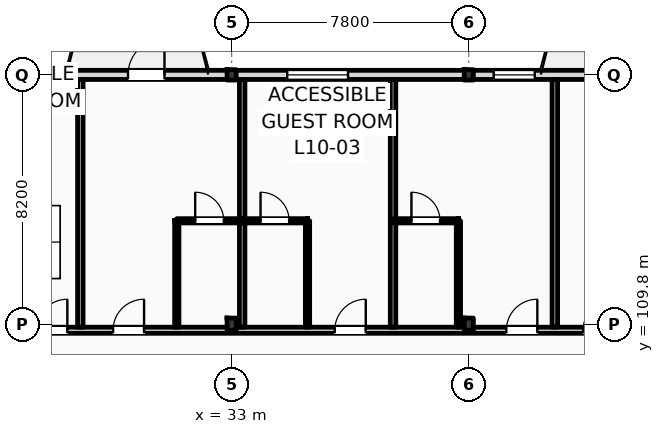
"""IFC4 building model, lengths in metres.
Left out: names, types, materials, properties, quantities, classifications, styles, units other than length and angle.
Written with IfcOpenShell. Run it as: python <this file> out.ifc"""

import sys

from ifc_helpers import new_model, si_unit, direction, frame, frame_2d, origin, origin_2d, place, context, subcontext, project, spatial, rectangle, i_section, extrude, element, fill, save


model = new_model("IFC4")
c1 = context("Model", 3, precision=1e-05, world=origin(), true_north=direction((0.0, 1.0)))
c2 = subcontext(c1, "Body", "Model", "MODEL_VIEW")
j1 = project(units=[si_unit("LENGTHUNIT", "METRE"), si_unit("PLANEANGLEUNIT", "RADIAN")], contexts=[c1])
p1 = place(None, origin())
s1 = spatial("IfcSite", under=j1, at=p1, CompositionType="ELEMENT")
p2 = place(p1, origin())
s2 = spatial("IfcBuilding", under=s1, at=p2, CompositionType="ELEMENT")
p3 = place(p2, frame((0.0, 0.0, 42.6)))
s3 = spatial("IfcBuildingStorey", under=s2, at=p3, CompositionType="ELEMENT", Elevation=42.6)
p4 = place(p3, frame((33.0, 109.8, 0.0), z_axis=(0.0, 0.0, 1.0), x_axis=(1.0, 0.0, 0.0)))
e1 = element("IfcColumn", 1, at=p4, inside=s3, PredefinedType="COLUMN", context=c2, shape_type="SweptSolid", body=[
    extrude(i_section(OverallWidth=0.3, OverallDepth=0.4, WebThickness=0.013, FlangeThickness=0.024, FilletRadius=0.027, at=origin_2d()), origin(), (0.0, 0.0, 1.0), 4.2),
])
p5 = place(p3, frame((33.0, 118.0, 0.0), z_axis=(0.0, 0.0, 1.0), x_axis=(1.0, 0.0, 0.0)))
e2 = element("IfcColumn", 2, at=p5, inside=s3, PredefinedType="COLUMN", context=c2, shape_type="SweptSolid", body=[
    extrude(i_section(OverallWidth=0.3, OverallDepth=0.34, WebThickness=0.012, FlangeThickness=0.021, FilletRadius=0.027, at=origin_2d()), origin(), (0.0, 0.0, 1.0), 4.2),
])
p6 = place(p3, frame((40.8, 109.8, 0.0), z_axis=(0.0, 0.0, 1.0), x_axis=(1.0, 0.0, 0.0)))
e3 = element("IfcColumn", 3, at=p6, inside=s3, PredefinedType="COLUMN", context=c2, shape_type="SweptSolid", body=[
    extrude(i_section(OverallWidth=0.3, OverallDepth=0.4, WebThickness=0.013, FlangeThickness=0.024, FilletRadius=0.027, at=origin_2d()), origin(), (0.0, 0.0, 1.0), 4.2),
])
p7 = place(p3, frame((40.8, 118.0, 0.0), z_axis=(0.0, 0.0, 1.0), x_axis=(1.0, 0.0, 0.0)))
e4 = element("IfcColumn", 4, at=p7, inside=s3, PredefinedType="COLUMN", context=c2, shape_type="SweptSolid", body=[
    extrude(i_section(OverallWidth=0.3, OverallDepth=0.34, WebThickness=0.012, FlangeThickness=0.021, FilletRadius=0.027, at=origin_2d()), origin(), (0.0, 0.0, 1.0), 4.2),
])
p8 = place(p3, frame((22.5, 118.0, 0.0), z_axis=(0.0, 0.0, 1.0), x_axis=(1.0, 0.0, 0.0)))
e5 = element("IfcWall", 5, at=p8, inside=s3, PredefinedType="STANDARD", context=c2, shape_type="SweptSolid", body=[
    extrude(rectangle(XDim=72.9, YDim=0.3, at=frame_2d((36.45, 0.0))), origin(), (0.0, 0.0, 1.0), 3.42),
])
p9 = place(p8, frame((3.611, 0.0, 0.9)))
e6 = element("IfcOpeningElement", 6, at=p9, cuts=e5, PredefinedType="OPENING", context=c2, shape_type="SweptSolid", body=[
    extrude(rectangle(XDim=1.35, YDim=1.75, at=frame_2d((0.675, 0.875))), frame((0.0, 0.16, 0.0), z_axis=(0.0, -1.0, 0.0), x_axis=(1.0, 0.0, 0.0)), (0.0, 0.0, 1.0), 0.32),
])
p10 = place(p8, frame((7.091, 0.0, 0.0)))
e7 = element("IfcOpeningElement", 7, at=p10, cuts=e5, PredefinedType="OPENING", context=c2, shape_type="SweptSolid", body=[
    extrude(rectangle(XDim=1.2, YDim=2.25, at=frame_2d((0.6, 1.125))), frame((0.0, 0.16, 0.0), z_axis=(0.0, -1.0, 0.0), x_axis=(1.0, 0.0, 0.0)), (0.0, 0.0, 1.0), 0.32),
])
p11 = place(p8, frame((12.328, 0.0, 0.9)))
e8 = element("IfcOpeningElement", 8, at=p11, cuts=e5, PredefinedType="OPENING", context=c2, shape_type="SweptSolid", body=[
    extrude(rectangle(XDim=2.0, YDim=2.34, at=frame_2d((1.0, 1.17))), frame((0.0, 0.16, 0.0), z_axis=(0.0, -1.0, 0.0), x_axis=(1.0, 0.0, 0.0)), (0.0, 0.0, 1.0), 0.32),
])
p12 = place(p8, frame((19.12, 0.0, 0.9)))
e9 = element("IfcOpeningElement", 9, at=p12, cuts=e5, PredefinedType="OPENING", context=c2, shape_type="SweptSolid", body=[
    extrude(rectangle(XDim=1.35, YDim=2.34, at=frame_2d((0.675, 1.17))), frame((0.0, 0.16, 0.0), z_axis=(0.0, -1.0, 0.0), x_axis=(1.0, 0.0, 0.0)), (0.0, 0.0, 1.0), 0.32),
])
p13 = place(p8, frame((22.696, 0.0, 0.0)))
e10 = element("IfcOpeningElement", 10, at=p13, cuts=e5, PredefinedType="OPENING", context=c2, shape_type="SweptSolid", body=[
    extrude(rectangle(XDim=1.2, YDim=2.25, at=frame_2d((0.6, 1.125))), frame((0.0, 0.16, 0.0), z_axis=(0.0, -1.0, 0.0), x_axis=(1.0, 0.0, 0.0)), (0.0, 0.0, 1.0), 0.32),
])
p14 = place(p8, frame((27.205, 0.0, 0.9)))
e11 = element("IfcOpeningElement", 11, at=p14, cuts=e5, PredefinedType="OPENING", context=c2, shape_type="SweptSolid", body=[
    extrude(rectangle(XDim=3.1, YDim=2.34, at=frame_2d((1.55, 1.17))), frame((0.0, 0.16, 0.0), z_axis=(0.0, -1.0, 0.0), x_axis=(1.0, 0.0, 0.0)), (0.0, 0.0, 1.0), 0.32),
])
p15 = place(p8, frame((31.948, 0.0, 0.9)))
e12 = element("IfcOpeningElement", 12, at=p15, cuts=e5, PredefinedType="OPENING", context=c2, shape_type="SweptSolid", body=[
    extrude(rectangle(XDim=1.1, YDim=2.34, at=frame_2d((0.55, 1.17))), frame((0.0, 0.16, 0.0), z_axis=(0.0, -1.0, 0.0), x_axis=(1.0, 0.0, 0.0)), (0.0, 0.0, 1.0), 0.32),
])
p16 = place(p8, frame((38.12, 0.0, 0.0)))
e13 = element("IfcOpeningElement", 13, at=p16, cuts=e5, PredefinedType="OPENING", context=c2, shape_type="SweptSolid", body=[
    extrude(rectangle(XDim=1.2, YDim=2.25, at=frame_2d((0.6, 1.125))), frame((0.0, 0.16, 0.0), z_axis=(0.0, -1.0, 0.0), x_axis=(1.0, 0.0, 0.0)), (0.0, 0.0, 1.0), 0.32),
])
p17 = place(p8, frame((43.51, 0.0, 0.9)))
e14 = element("IfcOpeningElement", 14, at=p17, cuts=e5, PredefinedType="OPENING", context=c2, shape_type="SweptSolid", body=[
    extrude(rectangle(XDim=1.35, YDim=1.85, at=frame_2d((0.675, 0.925))), frame((0.0, 0.16, 0.0), z_axis=(0.0, -1.0, 0.0), x_axis=(1.0, 0.0, 0.0)), (0.0, 0.0, 1.0), 0.32),
])
p18 = place(p8, frame((47.178, 0.0, 0.9)))
e15 = element("IfcOpeningElement", 15, at=p18, cuts=e5, PredefinedType="OPENING", context=c2, shape_type="SweptSolid", body=[
    extrude(rectangle(XDim=1.5, YDim=1.9, at=frame_2d((0.75, 0.95))), frame((0.0, 0.16, 0.0), z_axis=(0.0, -1.0, 0.0), x_axis=(1.0, 0.0, 0.0)), (0.0, 0.0, 1.0), 0.32),
])
p19 = place(p8, frame((53.724, 0.0, 0.0)))
e16 = element("IfcOpeningElement", 16, at=p19, cuts=e5, PredefinedType="OPENING", context=c2, shape_type="SweptSolid", body=[
    extrude(rectangle(XDim=1.2, YDim=2.25, at=frame_2d((0.6, 1.125))), frame((0.0, 0.16, 0.0), z_axis=(0.0, -1.0, 0.0), x_axis=(1.0, 0.0, 0.0)), (0.0, 0.0, 1.0), 0.32),
])
p20 = place(p8, frame((58.712, 0.0, 0.9)))
e17 = element("IfcOpeningElement", 17, at=p20, cuts=e5, PredefinedType="OPENING", context=c2, shape_type="SweptSolid", body=[
    extrude(rectangle(XDim=1.8, YDim=2.0, at=frame_2d((0.9, 1.0))), frame((0.0, 0.16, 0.0), z_axis=(0.0, -1.0, 0.0), x_axis=(1.0, 0.0, 0.0)), (0.0, 0.0, 1.0), 0.32),
])
p21 = place(p8, frame((62.781, 0.0, 0.9)))
e18 = element("IfcOpeningElement", 18, at=p21, cuts=e5, PredefinedType="OPENING", context=c2, shape_type="SweptSolid", body=[
    extrude(rectangle(XDim=1.35, YDim=2.05, at=frame_2d((0.675, 1.025))), frame((0.0, 0.16, 0.0), z_axis=(0.0, -1.0, 0.0), x_axis=(1.0, 0.0, 0.0)), (0.0, 0.0, 1.0), 0.32),
])
p22 = place(p8, frame((68.819, 0.0, 0.9)))
e19 = element("IfcOpeningElement", 19, at=p22, cuts=e5, PredefinedType="OPENING", context=c2, shape_type="SweptSolid", body=[
    extrude(rectangle(XDim=2.1, YDim=2.1, at=frame_2d((1.05, 1.05))), frame((0.0, 0.16, 0.0), z_axis=(0.0, -1.0, 0.0), x_axis=(1.0, 0.0, 0.0)), (0.0, 0.0, 1.0), 0.32),
])
p23 = place(p3, frame((10.65, 109.6, 0.0), z_axis=(0.0, 0.0, 1.0), x_axis=(1.0, 0.0, 0.0)))
e20 = element("IfcWall", 20, at=p23, inside=s3, PredefinedType="PARTITIONING", context=c2, shape_type="SweptSolid", body=[
    extrude(rectangle(XDim=84.61, YDim=0.2, at=frame_2d((42.305, 0.0))), origin(), (0.0, 0.0, 1.0), 3.38),
])
p24 = place(p23, frame((15.926, 0.0, 0.0)))
e21 = element("IfcOpeningElement", 21, at=p24, cuts=e20, PredefinedType="OPENING", context=c2, shape_type="SweptSolid", body=[
    extrude(rectangle(XDim=1.02, YDim=2.2, at=frame_2d((0.51, 1.1))), frame((0.0, 0.11, 0.0), z_axis=(0.0, -1.0, 0.0), x_axis=(1.0, 0.0, 0.0)), (0.0, 0.0, 1.0), 0.22),
])
p25 = place(p23, frame((18.45, 0.0, 0.0)))
e22 = element("IfcOpeningElement", 22, at=p25, cuts=e20, PredefinedType="OPENING", context=c2, shape_type="SweptSolid", body=[
    extrude(rectangle(XDim=1.02, YDim=2.2, at=frame_2d((0.51, 1.1))), frame((0.0, 0.11, 0.0), z_axis=(0.0, -1.0, 0.0), x_axis=(1.0, 0.0, 0.0)), (0.0, 0.0, 1.0), 0.22),
])
p26 = place(p23, frame((25.742, 0.0, 0.0)))
e23 = element("IfcOpeningElement", 23, at=p26, cuts=e20, PredefinedType="OPENING", context=c2, shape_type="SweptSolid", body=[
    extrude(rectangle(XDim=1.02, YDim=2.2, at=frame_2d((0.51, 1.1))), frame((0.0, 0.11, 0.0), z_axis=(0.0, -1.0, 0.0), x_axis=(1.0, 0.0, 0.0)), (0.0, 0.0, 1.0), 0.22),
])
p27 = place(p23, frame((31.385, 0.0, 0.0)))
e24 = element("IfcOpeningElement", 24, at=p27, cuts=e20, PredefinedType="OPENING", context=c2, shape_type="SweptSolid", body=[
    extrude(rectangle(XDim=1.02, YDim=2.2, at=frame_2d((0.51, 1.1))), frame((0.0, 0.11, 0.0), z_axis=(0.0, -1.0, 0.0), x_axis=(1.0, 0.0, 0.0)), (0.0, 0.0, 1.0), 0.22),
])
p28 = place(p23, frame((33.908, 0.0, 0.0)))
e25 = element("IfcOpeningElement", 25, at=p28, cuts=e20, PredefinedType="OPENING", context=c2, shape_type="SweptSolid", body=[
    extrude(rectangle(XDim=0.96, YDim=2.2, at=frame_2d((0.48, 1.1))), frame((0.0, 0.11, 0.0), z_axis=(0.0, -1.0, 0.0), x_axis=(1.0, 0.0, 0.0)), (0.0, 0.0, 1.0), 0.22),
])
p29 = place(p23, frame((41.201, 0.0, 0.0)))
e26 = element("IfcOpeningElement", 26, at=p29, cuts=e20, PredefinedType="OPENING", context=c2, shape_type="SweptSolid", body=[
    extrude(rectangle(XDim=0.96, YDim=2.2, at=frame_2d((0.48, 1.1))), frame((0.0, 0.11, 0.0), z_axis=(0.0, -1.0, 0.0), x_axis=(1.0, 0.0, 0.0)), (0.0, 0.0, 1.0), 0.22),
])
p30 = place(p23, frame((46.844, 0.0, 0.0)))
e27 = element("IfcOpeningElement", 27, at=p30, cuts=e20, PredefinedType="OPENING", context=c2, shape_type="SweptSolid", body=[
    extrude(rectangle(XDim=0.96, YDim=2.2, at=frame_2d((0.48, 1.1))), frame((0.0, 0.11, 0.0), z_axis=(0.0, -1.0, 0.0), x_axis=(1.0, 0.0, 0.0)), (0.0, 0.0, 1.0), 0.22),
])
p31 = place(p23, frame((49.337, 0.0, 0.0)))
e28 = element("IfcOpeningElement", 28, at=p31, cuts=e20, PredefinedType="OPENING", context=c2, shape_type="SweptSolid", body=[
    extrude(rectangle(XDim=0.96, YDim=2.2, at=frame_2d((0.48, 1.1))), frame((0.0, 0.11, 0.0), z_axis=(0.0, -1.0, 0.0), x_axis=(1.0, 0.0, 0.0)), (0.0, 0.0, 1.0), 0.22),
])
p32 = place(p23, frame((56.63, 0.0, 0.0)))
e29 = element("IfcOpeningElement", 29, at=p32, cuts=e20, PredefinedType="OPENING", context=c2, shape_type="SweptSolid", body=[
    extrude(rectangle(XDim=0.96, YDim=2.2, at=frame_2d((0.48, 1.1))), frame((0.0, 0.11, 0.0), z_axis=(0.0, -1.0, 0.0), x_axis=(1.0, 0.0, 0.0)), (0.0, 0.0, 1.0), 0.22),
])
p33 = place(p23, frame((62.523, 0.0, 0.0)))
e30 = element("IfcOpeningElement", 30, at=p33, cuts=e20, PredefinedType="OPENING", context=c2, shape_type="SweptSolid", body=[
    extrude(rectangle(XDim=0.96, YDim=2.2, at=frame_2d((0.48, 1.1))), frame((0.0, 0.11, 0.0), z_axis=(0.0, -1.0, 0.0), x_axis=(1.0, 0.0, 0.0)), (0.0, 0.0, 1.0), 0.22),
])
p34 = place(p23, frame((64.765, 0.0, 0.0)))
e31 = element("IfcOpeningElement", 31, at=p34, cuts=e20, PredefinedType="OPENING", context=c2, shape_type="SweptSolid", body=[
    extrude(rectangle(XDim=0.96, YDim=2.2, at=frame_2d((0.48, 1.1))), frame((0.0, 0.11, 0.0), z_axis=(0.0, -1.0, 0.0), x_axis=(1.0, 0.0, 0.0)), (0.0, 0.0, 1.0), 0.22),
])
p35 = place(p23, frame((72.057, 0.0, 0.0)))
e32 = element("IfcOpeningElement", 32, at=p35, cuts=e20, PredefinedType="OPENING", context=c2, shape_type="SweptSolid", body=[
    extrude(rectangle(XDim=0.96, YDim=2.2, at=frame_2d((0.48, 1.1))), frame((0.0, 0.11, 0.0), z_axis=(0.0, -1.0, 0.0), x_axis=(1.0, 0.0, 0.0)), (0.0, 0.0, 1.0), 0.22),
])
p36 = place(p23, frame((74.55, 0.0, 0.0)))
e33 = element("IfcOpeningElement", 33, at=p36, cuts=e20, PredefinedType="OPENING", context=c2, shape_type="SweptSolid", body=[
    extrude(rectangle(XDim=0.96, YDim=2.2, at=frame_2d((0.48, 1.1))), frame((0.0, 0.11, 0.0), z_axis=(0.0, -1.0, 0.0), x_axis=(1.0, 0.0, 0.0)), (0.0, 0.0, 1.0), 0.22),
])
p37 = place(p23, frame((80.163, 0.0, 0.0)))
e34 = element("IfcOpeningElement", 34, at=p37, cuts=e20, PredefinedType="OPENING", context=c2, shape_type="SweptSolid", body=[
    extrude(rectangle(XDim=0.96, YDim=2.2, at=frame_2d((0.48, 1.1))), frame((0.0, 0.11, 0.0), z_axis=(0.0, -1.0, 0.0), x_axis=(1.0, 0.0, 0.0)), (0.0, 0.0, 1.0), 0.22),
])
p38 = place(p23, frame((2.716, 0.0, 0.0)))
e35 = element("IfcOpeningElement", 35, at=p38, cuts=e20, PredefinedType="OPENING", context=c2, shape_type="SweptSolid", body=[
    extrude(rectangle(XDim=1.35, YDim=2.25, at=frame_2d((0.675, 1.125))), frame((0.0, 0.11, 0.0), z_axis=(0.0, -1.0, 0.0), x_axis=(1.0, 0.0, 0.0)), (0.0, 0.0, 1.0), 0.22),
])
p39 = place(p23, frame((6.65, 0.0, 0.0)))
e36 = element("IfcOpeningElement", 36, at=p39, cuts=e20, PredefinedType="OPENING", context=c2, shape_type="SweptSolid", body=[
    extrude(rectangle(XDim=1.35, YDim=2.25, at=frame_2d((0.675, 1.125))), frame((0.0, 0.11, 0.0), z_axis=(0.0, -1.0, 0.0), x_axis=(1.0, 0.0, 0.0)), (0.0, 0.0, 1.0), 0.22),
])
p40 = place(p23, frame((10.583, 0.0, 0.0)))
e37 = element("IfcOpeningElement", 37, at=p40, cuts=e20, PredefinedType="OPENING", context=c2, shape_type="SweptSolid", body=[
    extrude(rectangle(XDim=1.35, YDim=2.25, at=frame_2d((0.675, 1.125))), frame((0.0, 0.11, 0.0), z_axis=(0.0, -1.0, 0.0), x_axis=(1.0, 0.0, 0.0)), (0.0, 0.0, 1.0), 0.22),
])
p41 = place(p3, frame((28.023, 109.7, 0.0), z_axis=(0.0, 0.0, 1.0), x_axis=(0.0, 1.0, 0.0)))
e38 = element("IfcWall", 38, at=p41, inside=s3, PredefinedType="PARTITIONING", context=c2, shape_type="SweptSolid", body=[
    extrude(rectangle(XDim=8.15, YDim=0.18, at=frame_2d((4.075, 0.0))), origin(), (0.0, 0.0, 1.0), 3.63),
])
p42 = place(p3, frame((33.346, 109.7, 0.0), z_axis=(0.0, 0.0, 1.0), x_axis=(0.0, 1.0, 0.0)))
e39 = element("IfcWall", 39, at=p42, inside=s3, PredefinedType="PARTITIONING", context=c2, shape_type="SweptSolid", body=[
    extrude(rectangle(XDim=8.15, YDim=0.18, at=frame_2d((4.075, 0.0))), origin(), (0.0, 0.0, 1.0), 3.94),
])
p43 = place(p3, frame((31.196, 109.7, 0.0), z_axis=(0.0, 0.0, 1.0), x_axis=(0.0, 1.0, 0.0)))
e40 = element("IfcWall", 40, at=p43, inside=s3, PredefinedType="PARTITIONING", context=c2, shape_type="SweptSolid", body=[
    extrude(rectangle(XDim=3.5, YDim=0.14, at=frame_2d((1.75, 0.0))), origin(), (0.0, 0.0, 1.0), 3.94),
])
p44 = place(p3, frame((31.196, 113.2, 0.0), z_axis=(0.0, 0.0, 1.0), x_axis=(1.0, 0.0, 0.0)))
e41 = element("IfcWall", 41, at=p44, inside=s3, PredefinedType="PARTITIONING", context=c2, shape_type="SweptSolid", body=[
    extrude(rectangle(XDim=2.15, YDim=0.14, at=frame_2d((1.075, 0.0))), origin(), (0.0, 0.0, 1.0), 3.94),
])
p45 = place(p44, frame((0.605, 0.0, 0.0)))
e42 = element("IfcOpeningElement", 42, at=p45, cuts=e41, PredefinedType="OPENING", context=c2, shape_type="SweptSolid", body=[
    extrude(rectangle(XDim=0.94, YDim=2.15, at=frame_2d((0.47, 1.075))), frame((0.0, 0.08, 0.0), z_axis=(0.0, -1.0, 0.0), x_axis=(1.0, 0.0, 0.0)), (0.0, 0.0, 1.0), 0.16),
])
p46 = place(p3, frame((38.309, 109.7, 0.0), z_axis=(0.0, 0.0, 1.0), x_axis=(0.0, 1.0, 0.0)))
e43 = element("IfcWall", 43, at=p46, inside=s3, PredefinedType="PARTITIONING", context=c2, shape_type="SweptSolid", body=[
    extrude(rectangle(XDim=8.15, YDim=0.18, at=frame_2d((4.075, 0.0))), origin(), (0.0, 0.0, 1.0), 3.63),
])
p47 = place(p3, frame((35.496, 109.7, 0.0), z_axis=(0.0, 0.0, 1.0), x_axis=(0.0, 1.0, 0.0)))
e44 = element("IfcWall", 44, at=p47, inside=s3, PredefinedType="PARTITIONING", context=c2, shape_type="SweptSolid", body=[
    extrude(rectangle(XDim=3.5, YDim=0.14, at=frame_2d((1.75, 0.0))), origin(), (0.0, 0.0, 1.0), 3.63),
])
p48 = place(p3, frame((33.346, 113.2, 0.0), z_axis=(0.0, 0.0, 1.0), x_axis=(1.0, 0.0, 0.0)))
e45 = element("IfcWall", 45, at=p48, inside=s3, PredefinedType="PARTITIONING", context=c2, shape_type="SweptSolid", body=[
    extrude(rectangle(XDim=2.15, YDim=0.14, at=frame_2d((1.075, 0.0))), origin(), (0.0, 0.0, 1.0), 3.94),
])
p49 = place(p48, frame((0.605, 0.0, 0.0)))
e46 = element("IfcOpeningElement", 46, at=p49, cuts=e45, PredefinedType="OPENING", context=c2, shape_type="SweptSolid", body=[
    extrude(rectangle(XDim=0.94, YDim=2.15, at=frame_2d((0.47, 1.075))), frame((0.0, 0.08, 0.0), z_axis=(0.0, -1.0, 0.0), x_axis=(1.0, 0.0, 0.0)), (0.0, 0.0, 1.0), 0.16),
])
p50 = place(p3, frame((43.631, 109.7, 0.0), z_axis=(0.0, 0.0, 1.0), x_axis=(0.0, 1.0, 0.0)))
e47 = element("IfcWall", 47, at=p50, inside=s3, PredefinedType="PARTITIONING", context=c2, shape_type="SweptSolid", body=[
    extrude(rectangle(XDim=8.15, YDim=0.18, at=frame_2d((4.075, 0.0))), origin(), (0.0, 0.0, 1.0), 3.63),
])
p51 = place(p3, frame((40.459, 109.7, 0.0), z_axis=(0.0, 0.0, 1.0), x_axis=(0.0, 1.0, 0.0)))
e48 = element("IfcWall", 48, at=p51, inside=s3, PredefinedType="PARTITIONING", context=c2, shape_type="SweptSolid", body=[
    extrude(rectangle(XDim=3.5, YDim=0.14, at=frame_2d((1.75, 0.0))), origin(), (0.0, 0.0, 1.0), 3.94),
])
p52 = place(p3, frame((38.309, 113.2, 0.0), z_axis=(0.0, 0.0, 1.0), x_axis=(1.0, 0.0, 0.0)))
e49 = element("IfcWall", 49, at=p52, inside=s3, PredefinedType="PARTITIONING", context=c2, shape_type="SweptSolid", body=[
    extrude(rectangle(XDim=2.15, YDim=0.14, at=frame_2d((1.075, 0.0))), origin(), (0.0, 0.0, 1.0), 3.94),
])
p53 = place(p52, frame((0.605, 0.0, 0.0)))
e50 = element("IfcOpeningElement", 50, at=p53, cuts=e49, PredefinedType="OPENING", context=c2, shape_type="SweptSolid", body=[
    extrude(rectangle(XDim=0.94, YDim=2.15, at=frame_2d((0.47, 1.075))), frame((0.0, 0.08, 0.0), z_axis=(0.0, -1.0, 0.0), x_axis=(1.0, 0.0, 0.0)), (0.0, 0.0, 1.0), 0.16),
])
p54 = place(p9, origin())
e51 = element("IfcWindow", 51, at=p54, inside=s3, PartitioningType="DOUBLE_PANEL_VERTICAL", PredefinedType="WINDOW", context=c2, shape_type="SweptSolid", body=[
    extrude(rectangle(XDim=1.35, YDim=1.75, at=frame_2d((0.675, 0.875))), frame((0.0, 0.03, 0.0), z_axis=(0.0, -1.0, 0.0), x_axis=(1.0, 0.0, 0.0)), (0.0, 0.0, 1.0), 0.06),
])
fill(e6, e51)
p55 = place(p10, origin())
e52 = element("IfcDoor", 52, at=p55, inside=s3, OperationType="SINGLE_SWING_RIGHT", PredefinedType="DOOR", context=c2, shape_type="SweptSolid", body=[
    extrude(rectangle(XDim=1.2, YDim=2.25, at=frame_2d((0.6, 1.125))), frame((0.0, 0.025, 0.0), z_axis=(0.0, -1.0, 0.0), x_axis=(1.0, 0.0, 0.0)), (0.0, 0.0, 1.0), 0.05),
])
fill(e7, e52)
p56 = place(p11, origin())
e53 = element("IfcWindow", 53, at=p56, inside=s3, PartitioningType="DOUBLE_PANEL_VERTICAL", PredefinedType="WINDOW", context=c2, shape_type="SweptSolid", body=[
    extrude(rectangle(XDim=2.0, YDim=2.34, at=frame_2d((1.0, 1.17))), frame((0.0, 0.03, 0.0), z_axis=(0.0, -1.0, 0.0), x_axis=(1.0, 0.0, 0.0)), (0.0, 0.0, 1.0), 0.06),
])
fill(e8, e53)
p57 = place(p12, origin())
e54 = element("IfcWindow", 54, at=p57, inside=s3, PartitioningType="DOUBLE_PANEL_VERTICAL", PredefinedType="WINDOW", context=c2, shape_type="SweptSolid", body=[
    extrude(rectangle(XDim=1.35, YDim=2.34, at=frame_2d((0.675, 1.17))), frame((0.0, 0.03, 0.0), z_axis=(0.0, -1.0, 0.0), x_axis=(1.0, 0.0, 0.0)), (0.0, 0.0, 1.0), 0.06),
])
fill(e9, e54)
p58 = place(p24, origin())
e55 = element("IfcDoor", 55, at=p58, inside=s3, OperationType="SINGLE_SWING_RIGHT", PredefinedType="DOOR", context=c2, shape_type="SweptSolid", body=[
    extrude(rectangle(XDim=1.02, YDim=2.2, at=frame_2d((0.51, 1.1))), frame((0.0, 0.025, 0.0), z_axis=(0.0, -1.0, 0.0), x_axis=(1.0, 0.0, 0.0)), (0.0, 0.0, 1.0), 0.05),
])
fill(e21, e55)
p59 = place(p25, origin())
e56 = element("IfcDoor", 56, at=p59, inside=s3, OperationType="SINGLE_SWING_RIGHT", PredefinedType="DOOR", context=c2, shape_type="SweptSolid", body=[
    extrude(rectangle(XDim=1.02, YDim=2.2, at=frame_2d((0.51, 1.1))), frame((0.0, 0.025, 0.0), z_axis=(0.0, -1.0, 0.0), x_axis=(1.0, 0.0, 0.0)), (0.0, 0.0, 1.0), 0.05),
])
fill(e22, e56)
p60 = place(p45, origin())
e57 = element("IfcDoor", 57, at=p60, inside=s3, OperationType="SINGLE_SWING_LEFT", PredefinedType="DOOR", context=c2, shape_type="SweptSolid", body=[
    extrude(rectangle(XDim=0.94, YDim=2.15, at=frame_2d((0.47, 1.075))), frame((0.0, 0.025, 0.0), z_axis=(0.0, -1.0, 0.0), x_axis=(1.0, 0.0, 0.0)), (0.0, 0.0, 1.0), 0.05),
])
fill(e42, e57)
p61 = place(p26, origin())
e58 = element("IfcDoor", 58, at=p61, inside=s3, OperationType="SINGLE_SWING_RIGHT", PredefinedType="DOOR", context=c2, shape_type="SweptSolid", body=[
    extrude(rectangle(XDim=1.02, YDim=2.2, at=frame_2d((0.51, 1.1))), frame((0.0, 0.025, 0.0), z_axis=(0.0, -1.0, 0.0), x_axis=(1.0, 0.0, 0.0)), (0.0, 0.0, 1.0), 0.05),
])
fill(e23, e58)
p62 = place(p49, origin())
e59 = element("IfcDoor", 59, at=p62, inside=s3, OperationType="SINGLE_SWING_LEFT", PredefinedType="DOOR", context=c2, shape_type="SweptSolid", body=[
    extrude(rectangle(XDim=0.94, YDim=2.15, at=frame_2d((0.47, 1.075))), frame((0.0, 0.025, 0.0), z_axis=(0.0, -1.0, 0.0), x_axis=(1.0, 0.0, 0.0)), (0.0, 0.0, 1.0), 0.05),
])
fill(e46, e59)
p63 = place(p27, origin())
e60 = element("IfcDoor", 60, at=p63, inside=s3, OperationType="SINGLE_SWING_RIGHT", PredefinedType="DOOR", context=c2, shape_type="SweptSolid", body=[
    extrude(rectangle(XDim=1.02, YDim=2.2, at=frame_2d((0.51, 1.1))), frame((0.0, 0.025, 0.0), z_axis=(0.0, -1.0, 0.0), x_axis=(1.0, 0.0, 0.0)), (0.0, 0.0, 1.0), 0.05),
])
fill(e24, e60)
p64 = place(p53, origin())
e61 = element("IfcDoor", 61, at=p64, inside=s3, OperationType="SINGLE_SWING_LEFT", PredefinedType="DOOR", context=c2, shape_type="SweptSolid", body=[
    extrude(rectangle(XDim=0.94, YDim=2.15, at=frame_2d((0.47, 1.075))), frame((0.0, 0.025, 0.0), z_axis=(0.0, -1.0, 0.0), x_axis=(1.0, 0.0, 0.0)), (0.0, 0.0, 1.0), 0.05),
])
fill(e50, e61)
p65 = place(p28, origin())
e62 = element("IfcDoor", 62, at=p65, inside=s3, OperationType="SINGLE_SWING_RIGHT", PredefinedType="DOOR", context=c2, shape_type="SweptSolid", body=[
    extrude(rectangle(XDim=0.96, YDim=2.2, at=frame_2d((0.48, 1.1))), frame((0.0, 0.025, 0.0), z_axis=(0.0, -1.0, 0.0), x_axis=(1.0, 0.0, 0.0)), (0.0, 0.0, 1.0), 0.05),
])
fill(e25, e62)
save(model, sys.argv[1])
